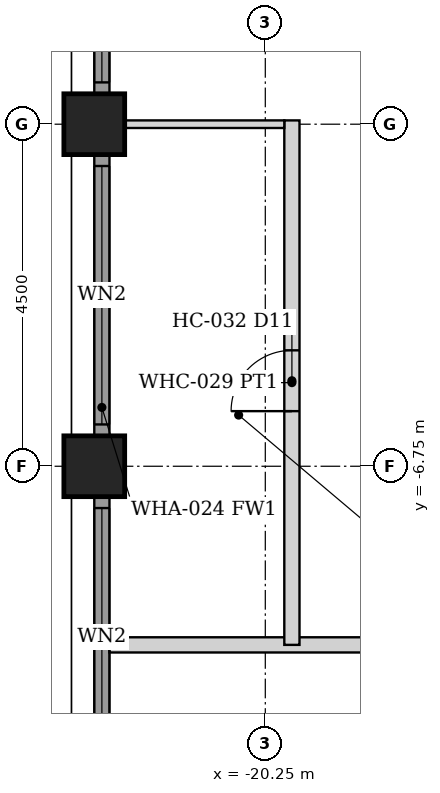
"""IFC4 building model, lengths in metres.
Left out: names, types, materials, properties, quantities, classifications, styles, units other than length and angle.
Written with IfcOpenShell. Run it as: python <this file> out.ifc"""

import sys

from ifc_helpers import new_model, si_unit, direction, frame, frame_2d, origin, origin_2d, place, context, subcontext, project, spatial, rectangle, hollow_rectangle, extrude, element, fill, save


model = new_model("IFC4")
c1 = context("Model", 3, precision=1e-05, world=origin(), true_north=direction((0.0, 1.0)))
c2 = subcontext(c1, "Body", "Model", "MODEL_VIEW")
j1 = project(units=[si_unit("LENGTHUNIT", "METRE"), si_unit("PLANEANGLEUNIT", "RADIAN")], contexts=[c1])
p1 = place(None, origin())
s1 = spatial("IfcSite", under=j1, at=p1, CompositionType="ELEMENT")
p2 = place(p1, origin())
s2 = spatial("IfcBuilding", under=s1, at=p2, CompositionType="ELEMENT")
p3 = place(p2, frame((0.0, 0.0, 140.0)))
s3 = spatial("IfcBuildingStorey", under=s2, at=p3, CompositionType="ELEMENT", Elevation=140.0)
for number, where, z_axis, x_axis in (
    (1, (-22.5, -6.75, 0.0), (0.0, 0.0, 1.0), (1.0, 0.0, 0.0)),
    (2, (-22.5, -2.25, 0.0), (0.0, 0.0, 1.0), (1.0, 0.0, 0.0)),
):
    element("IfcColumn", number, at=place(p3, frame(where, z_axis=z_axis, x_axis=x_axis)), inside=s3, PredefinedType="COLUMN", context=c2, shape_type="SweptSolid", body=[
        extrude(hollow_rectangle(XDim=0.8, YDim=0.8, WallThickness=0.05, at=origin_2d()), origin(), (0.0, 0.0, 1.0), 3.6),
    ])
p4 = place(p3, frame((-22.4, -10.845, 0.0), z_axis=(0.0, 0.0, 1.0), x_axis=(0.0, 1.0, 0.0)))
e3 = element("IfcWall", 3, at=p4, inside=s3, PredefinedType="SOLIDWALL", context=c2, shape_type="SweptSolid", body=[
    extrude(rectangle(XDim=3.69, YDim=0.2, at=frame_2d((1.845, 0.0))), origin(), (0.0, 0.0, 1.0), 2.479),
])
p5 = place(p4, frame((0.145, 0.0, 0.3)))
e4 = element("IfcOpeningElement", 4, at=p5, cuts=e3, PredefinedType="OPENING", context=c2, shape_type="SweptSolid", body=[
    extrude(rectangle(XDim=3.4, YDim=2.029, at=frame_2d((1.7, 1.015))), frame((0.0, 0.11, 0.0), z_axis=(0.0, -1.0, 0.0), x_axis=(1.0, 0.0, 0.0)), (0.0, 0.0, 1.0), 0.22),
])
p6 = place(p3, frame((-22.4, -6.345, 0.0), z_axis=(0.0, 0.0, 1.0), x_axis=(0.0, 1.0, 0.0)))
e5 = element("IfcWall", 5, at=p6, inside=s3, PredefinedType="SOLIDWALL", context=c2, shape_type="SweptSolid", body=[
    extrude(rectangle(XDim=3.69, YDim=0.2, at=frame_2d((1.845, 0.0))), origin(), (0.0, 0.0, 1.0), 2.479),
])
p7 = place(p6, frame((0.145, 0.0, 0.3)))
e6 = element("IfcOpeningElement", 6, at=p7, cuts=e5, PredefinedType="OPENING", context=c2, shape_type="SweptSolid", body=[
    extrude(rectangle(XDim=3.4, YDim=2.029, at=frame_2d((1.7, 1.015))), frame((0.0, 0.11, 0.0), z_axis=(0.0, -1.0, 0.0), x_axis=(1.0, 0.0, 0.0)), (0.0, 0.0, 1.0), 0.22),
])
p8 = place(p3, frame((-22.4, -1.845, 0.0), z_axis=(0.0, 0.0, 1.0), x_axis=(0.0, 1.0, 0.0)))
e7 = element("IfcWall", 7, at=p8, inside=s3, PredefinedType="SOLIDWALL", context=c2, shape_type="SweptSolid", body=[
    extrude(rectangle(XDim=3.69, YDim=0.2, at=frame_2d((1.845, 0.0))), origin(), (0.0, 0.0, 1.0), 2.479),
])
p9 = place(p8, frame((0.145, 0.0, 0.3)))
e8 = element("IfcOpeningElement", 8, at=p9, cuts=e7, PredefinedType="OPENING", context=c2, shape_type="SweptSolid", body=[
    extrude(rectangle(XDim=3.4, YDim=2.029, at=frame_2d((1.7, 1.015))), frame((0.0, 0.11, 0.0), z_axis=(0.0, -1.0, 0.0), x_axis=(1.0, 0.0, 0.0)), (0.0, 0.0, 1.0), 0.22),
])
p10 = place(p3, frame((-22.3, -9.1, 0.0), z_axis=(0.0, 0.0, 1.0), x_axis=(1.0, 0.0, 0.0)))
e9 = element("IfcWall", 9, at=p10, inside=s3, PredefinedType="PARTITIONING", context=c2, shape_type="SweptSolid", body=[
    extrude(rectangle(XDim=44.6, YDim=0.2, at=frame_2d((22.3, 0.0))), origin(), (0.0, 0.0, 1.0), 2.473),
])
p11 = place(p10, frame((6.75, 0.0, 0.0)))
e10 = element("IfcOpeningElement", 10, at=p11, cuts=e9, PredefinedType="OPENING", context=c2, shape_type="SweptSolid", body=[
    extrude(rectangle(XDim=0.9, YDim=2.1, at=frame_2d((0.45, 1.05))), frame((0.0, 0.11, 0.0), z_axis=(0.0, -1.0, 0.0), x_axis=(1.0, 0.0, 0.0)), (0.0, 0.0, 1.0), 0.22),
])
p12 = place(p10, frame((14.45, 0.0, 0.0)))
e11 = element("IfcOpeningElement", 11, at=p12, cuts=e9, PredefinedType="OPENING", context=c2, shape_type="SweptSolid", body=[
    extrude(rectangle(XDim=0.9, YDim=2.1, at=frame_2d((0.45, 1.05))), frame((0.0, 0.11, 0.0), z_axis=(0.0, -1.0, 0.0), x_axis=(1.0, 0.0, 0.0)), (0.0, 0.0, 1.0), 0.22),
])
p13 = place(p10, frame((15.75, 0.0, 0.0)))
e12 = element("IfcOpeningElement", 12, at=p13, cuts=e9, PredefinedType="OPENING", context=c2, shape_type="SweptSolid", body=[
    extrude(rectangle(XDim=0.9, YDim=2.1, at=frame_2d((0.45, 1.05))), frame((0.0, 0.11, 0.0), z_axis=(0.0, -1.0, 0.0), x_axis=(1.0, 0.0, 0.0)), (0.0, 0.0, 1.0), 0.22),
])
p14 = place(p10, frame((24.75, 0.0, 0.0)))
e13 = element("IfcOpeningElement", 13, at=p14, cuts=e9, PredefinedType="OPENING", context=c2, shape_type="SweptSolid", body=[
    extrude(rectangle(XDim=0.9, YDim=2.1, at=frame_2d((0.45, 1.05))), frame((0.0, 0.11, 0.0), z_axis=(0.0, -1.0, 0.0), x_axis=(1.0, 0.0, 0.0)), (0.0, 0.0, 1.0), 0.22),
])
p15 = place(p10, frame((36.95, 0.0, 0.0)))
e14 = element("IfcOpeningElement", 14, at=p15, cuts=e9, PredefinedType="OPENING", context=c2, shape_type="SweptSolid", body=[
    extrude(rectangle(XDim=0.9, YDim=2.1, at=frame_2d((0.45, 1.05))), frame((0.0, 0.11, 0.0), z_axis=(0.0, -1.0, 0.0), x_axis=(1.0, 0.0, 0.0)), (0.0, 0.0, 1.0), 0.22),
])
p16 = place(p10, frame((38.85, 0.0, 0.0)))
e15 = element("IfcOpeningElement", 15, at=p16, cuts=e9, PredefinedType="OPENING", context=c2, shape_type="SweptSolid", body=[
    extrude(rectangle(XDim=0.9, YDim=2.1, at=frame_2d((0.45, 1.05))), frame((0.0, 0.11, 0.0), z_axis=(0.0, -1.0, 0.0), x_axis=(1.0, 0.0, 0.0)), (0.0, 0.0, 1.0), 0.22),
])
p17 = place(p10, frame((4.85, 0.0, 0.0)))
e16 = element("IfcOpeningElement", 16, at=p17, cuts=e9, PredefinedType="OPENING", context=c2, shape_type="SweptSolid", body=[
    extrude(rectangle(XDim=0.9, YDim=2.1, at=frame_2d((0.45, 1.05))), frame((0.0, 0.11, 0.0), z_axis=(0.0, -1.0, 0.0), x_axis=(1.0, 0.0, 0.0)), (0.0, 0.0, 1.0), 0.22),
])
p18 = place(p3, frame((-19.9, -9.1, 0.0), z_axis=(0.0, 0.0, 1.0), x_axis=(0.0, 1.0, 0.0)))
e17 = element("IfcWall", 17, at=p18, inside=s3, PredefinedType="PARTITIONING", context=c2, shape_type="SweptSolid", body=[
    extrude(rectangle(XDim=6.9, YDim=0.2, at=frame_2d((3.45, 0.0))), origin(), (0.0, 0.0, 1.0), 2.473),
])
p19 = place(p18, frame((3.075, 0.0, 0.0)))
e18 = element("IfcOpeningElement", 18, at=p19, cuts=e17, PredefinedType="OPENING", context=c2, shape_type="SweptSolid", body=[
    extrude(rectangle(XDim=0.8, YDim=2.1, at=frame_2d((0.4, 1.05))), frame((0.0, 0.11, 0.0), z_axis=(0.0, -1.0, 0.0), x_axis=(1.0, 0.0, 0.0)), (0.0, 0.0, 1.0), 0.22),
])
p20 = place(p3, frame((-22.1, -2.25, 0.0), z_axis=(0.0, 0.0, 1.0), x_axis=(1.0, 0.0, 0.0)))
e19 = element("IfcWall", 19, at=p20, inside=s3, PredefinedType="PARTITIONING", context=c2, shape_type="SweptSolid", body=[
    extrude(rectangle(XDim=2.1, YDim=0.1, at=frame_2d((1.05, 0.0))), origin(), (0.0, 0.0, 1.0), 2.473),
])
p21 = place(p5, origin())
e20 = element("IfcWindow", 20, at=p21, inside=s3, PartitioningType="SINGLE_PANEL", PredefinedType="WINDOW", context=c2, shape_type="SweptSolid", body=[
    extrude(rectangle(XDim=3.4, YDim=2.029, at=frame_2d((1.7, 1.015))), frame((0.0, 0.03, 0.0), z_axis=(0.0, -1.0, 0.0), x_axis=(1.0, 0.0, 0.0)), (0.0, 0.0, 1.0), 0.06),
])
fill(e4, e20)
p22 = place(p7, origin())
e21 = element("IfcWindow", 21, at=p22, inside=s3, PartitioningType="SINGLE_PANEL", PredefinedType="WINDOW", context=c2, shape_type="SweptSolid", body=[
    extrude(rectangle(XDim=3.4, YDim=2.029, at=frame_2d((1.7, 1.015))), frame((0.0, 0.03, 0.0), z_axis=(0.0, -1.0, 0.0), x_axis=(1.0, 0.0, 0.0)), (0.0, 0.0, 1.0), 0.06),
])
fill(e6, e21)
p23 = place(p9, origin())
e22 = element("IfcWindow", 22, at=p23, inside=s3, PartitioningType="SINGLE_PANEL", PredefinedType="WINDOW", context=c2, shape_type="SweptSolid", body=[
    extrude(rectangle(XDim=3.4, YDim=2.029, at=frame_2d((1.7, 1.015))), frame((0.0, 0.03, 0.0), z_axis=(0.0, -1.0, 0.0), x_axis=(1.0, 0.0, 0.0)), (0.0, 0.0, 1.0), 0.06),
])
fill(e8, e22)
p24 = place(p19, origin())
e23 = element("IfcDoor", 23, at=p24, inside=s3, OperationType="SINGLE_SWING_LEFT", PredefinedType="DOOR", context=c2, shape_type="SweptSolid", body=[
    extrude(rectangle(XDim=0.8, YDim=2.1, at=frame_2d((0.4, 1.05))), frame((0.0, 0.025, 0.0), z_axis=(0.0, -1.0, 0.0), x_axis=(1.0, 0.0, 0.0)), (0.0, 0.0, 1.0), 0.05),
])
fill(e18, e23)
save(model, sys.argv[1])
